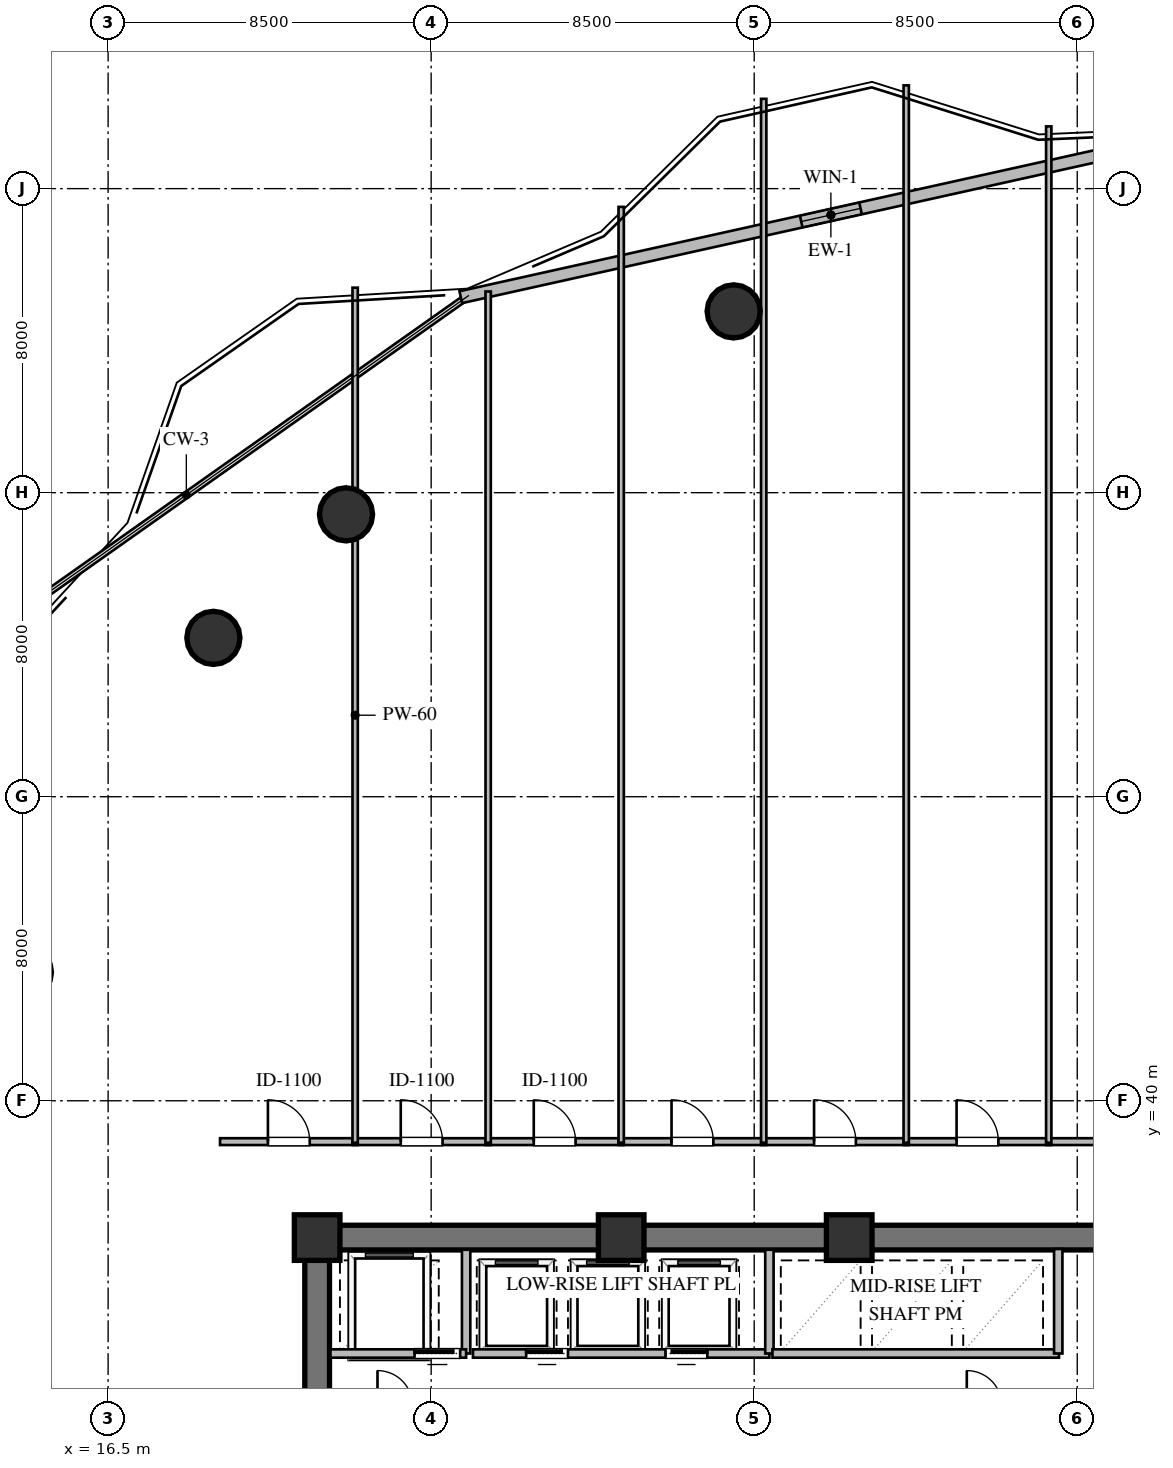
"""IFC4 building model, lengths in metres.
Left out: names, types, materials, properties, quantities, classifications, styles, units other than length and angle.
Written with IfcOpenShell. Run it as: python <this file> out.ifc"""

import sys

from ifc_helpers import new_model, si_unit, direction, frame, frame_2d, origin, origin_2d, place, context, subcontext, project, spatial, rectangle, circle, extrude, element, fill, save


model = new_model("IFC4")
c1 = context("Model", 3, precision=1e-05, world=origin(), true_north=direction((0.0, 1.0)))
c2 = subcontext(c1, "Body", "Model", "MODEL_VIEW")
j1 = project(units=[si_unit("LENGTHUNIT", "METRE"), si_unit("PLANEANGLEUNIT", "RADIAN")], contexts=[c1])
p1 = place(None, origin())
s1 = spatial("IfcSite", under=j1, at=p1, CompositionType="ELEMENT")
p2 = place(p1, origin())
s2 = spatial("IfcBuilding", under=s1, at=p2, CompositionType="ELEMENT")
p3 = place(p2, frame((0.0, 0.0, 63.6)))
s3 = spatial("IfcBuildingStorey", under=s2, at=p3, CompositionType="ELEMENT", Elevation=63.6)
p4 = place(p3, frame((21.675, 36.4, 0.0), z_axis=(0.0, 0.0, 1.0), x_axis=(1.0, 0.0, 0.0)))
e1 = element("IfcWall", 1, at=p4, inside=s3, PredefinedType="SHEAR", context=c2, shape_type="SweptSolid", body=[
    extrude(rectangle(XDim=22.65, YDim=0.65, at=frame_2d((11.325, 0.0))), origin(), (0.0, 0.0, 1.0), 3.36),
])
p5 = place(p3, frame((22.0, 23.925, 0.0), z_axis=(0.0, 0.0, 1.0), x_axis=(0.0, 1.0, 0.0)))
e2 = element("IfcWall", 2, at=p5, inside=s3, PredefinedType="SHEAR", context=c2, shape_type="SweptSolid", body=[
    extrude(rectangle(XDim=12.15, YDim=0.65, at=frame_2d((6.075, 0.0))), origin(), (0.0, 0.0, 1.0), 3.36),
])
for number, where, z_axis, x_axis in (
    (3, (36.0, 36.4, 0.0), (0.0, 0.0, 1.0), (1.0, 0.0, 0.0)),
    (4, (30.0, 36.4, 0.0), (0.0, 0.0, 1.0), (1.0, 0.0, 0.0)),
    (5, (22.0, 36.4, 0.0), (0.0, 0.0, 1.0), (1.0, 0.0, 0.0)),
):
    element("IfcColumn", number, at=place(p3, frame(where, z_axis=z_axis, x_axis=x_axis)), inside=s3, PredefinedType="COLUMN", context=c2, shape_type="SweptSolid", body=[
        extrude(rectangle(XDim=1.2, YDim=1.2, at=origin_2d()), origin(), (0.0, 0.0, 1.0), 3.6),
    ])
for number, where, z_axis, x_axis in (
    (6, (32.96, 60.77, 0.0), (0.0, 0.0, 1.0), (1.0, 0.0, 0.0)),
    (7, (22.76, 55.43, 0.0), (0.0, 0.0, 1.0), (1.0, 0.0, 0.0)),
    (8, (19.27, 52.18, 0.0), (0.0, 0.0, 1.0), (1.0, 0.0, 0.0)),
):
    element("IfcColumn", number, at=place(p3, frame(where, z_axis=z_axis, x_axis=x_axis)), inside=s3, PredefinedType="COLUMN", context=c2, shape_type="SweptSolid", body=[
        extrude(circle(Radius=0.7, at=origin_2d()), origin(), (0.0, 0.0, 1.0), 3.6),
    ])
p6 = place(p3, frame((25.78, 61.144, 0.0), z_axis=(0.0, 0.0, 1.0), x_axis=(0.976206349039, 0.216843639742, 0.0)))
e9 = element("IfcWall", 9, at=p6, inside=s3, PredefinedType="STANDARD", context=c2, shape_type="SweptSolid", body=[
    extrude(rectangle(XDim=19.949, YDim=0.32, at=frame_2d((9.975, 0.0))), origin(), (0.0, 0.0, 1.0), 3.36),
])
p7 = place(p6, frame((9.175, 0.0, 1.05)))
e10 = element("IfcOpeningElement", 10, at=p7, cuts=e9, PredefinedType="OPENING", context=c2, shape_type="SweptSolid", body=[
    extrude(rectangle(XDim=1.6, YDim=1.5, at=frame_2d((0.8, 0.75))), frame((0.0, 0.17, 0.0), z_axis=(0.0, -1.0, 0.0), x_axis=(1.0, 0.0, 0.0)), (0.0, 0.0, 1.0), 0.34),
])
p8 = place(p3, frame((25.92, 33.35, 0.0), z_axis=(0.0, 0.0, 1.0), x_axis=(0.0, 1.0, 0.0)))
e11 = element("IfcWall", 11, at=p8, inside=s3, PredefinedType="SOLIDWALL", context=c2, shape_type="SweptSolid", body=[
    extrude(rectangle(XDim=2.73, YDim=0.22, at=frame_2d((1.365, 0.0))), origin(), (0.0, 0.0, 1.0), 3.36),
])
p9 = place(p3, frame((22.35, 33.35, 0.0), z_axis=(0.0, 0.0, 1.0), x_axis=(1.0, 0.0, 0.0)))
e12 = element("IfcWall", 12, at=p9, inside=s3, PredefinedType="SOLIDWALL", context=c2, shape_type="SweptSolid", body=[
    extrude(rectangle(XDim=3.57, YDim=0.22, at=frame_2d((1.785, 0.0))), origin(), (0.0, 0.0, 1.0), 3.36),
])
p10 = place(p9, frame((2.213, 0.0, 0.0)))
e13 = element("IfcOpeningElement", 13, at=p10, cuts=e12, PredefinedType="OPENING", context=c2, shape_type="SweptSolid", body=[
    extrude(rectangle(XDim=1.2, YDim=2.1, at=frame_2d((0.6, 1.05))), frame((0.0, 0.12, 0.0), z_axis=(0.0, -1.0, 0.0), x_axis=(1.0, 0.0, 0.0)), (0.0, 0.0, 1.0), 0.24),
])
p11 = place(p3, frame((26.1, 33.35, 0.0), z_axis=(0.0, 0.0, 1.0), x_axis=(1.0, 0.0, 0.0)))
e14 = element("IfcWall", 14, at=p11, inside=s3, PredefinedType="SOLIDWALL", context=c2, shape_type="SweptSolid", body=[
    extrude(rectangle(XDim=7.8, YDim=0.22, at=frame_2d((3.9, 0.0))), origin(), (0.0, 0.0, 1.0), 3.36),
])
p12 = place(p11, frame((1.4, 0.0, 0.0)))
e15 = element("IfcOpeningElement", 15, at=p12, cuts=e14, PredefinedType="OPENING", context=c2, shape_type="SweptSolid", body=[
    extrude(rectangle(XDim=1.1, YDim=2.1, at=frame_2d((0.55, 1.05))), frame((0.0, 0.12, 0.0), z_axis=(0.0, -1.0, 0.0), x_axis=(1.0, 0.0, 0.0)), (0.0, 0.0, 1.0), 0.24),
])
p13 = place(p11, frame((5.066, 0.0, 0.0)))
e16 = element("IfcOpeningElement", 16, at=p13, cuts=e14, PredefinedType="OPENING", context=c2, shape_type="SweptSolid", body=[
    extrude(rectangle(XDim=1.1, YDim=2.1, at=frame_2d((0.55, 1.05))), frame((0.0, 0.12, 0.0), z_axis=(0.0, -1.0, 0.0), x_axis=(1.0, 0.0, 0.0)), (0.0, 0.0, 1.0), 0.24),
])
p14 = place(p3, frame((33.9, 33.35, 0.0), z_axis=(0.0, 0.0, 1.0), x_axis=(0.0, 1.0, 0.0)))
e17 = element("IfcWall", 17, at=p14, inside=s3, PredefinedType="SOLIDWALL", context=c2, shape_type="SweptSolid", body=[
    extrude(rectangle(XDim=2.73, YDim=0.22, at=frame_2d((1.365, 0.0))), origin(), (0.0, 0.0, 1.0), 3.36),
])
p15 = place(p3, frame((33.98, 33.35, 0.0), z_axis=(0.0, 0.0, 1.0), x_axis=(1.0, 0.0, 0.0)))
e18 = element("IfcWall", 18, at=p15, inside=s3, PredefinedType="SOLIDWALL", context=c2, shape_type="SweptSolid", body=[
    extrude(rectangle(XDim=7.54, YDim=0.22, at=frame_2d((3.77, 0.0))), origin(), (0.0, 0.0, 1.0), 3.36),
])
p16 = place(p3, frame((41.5, 33.35, 0.0), z_axis=(0.0, 0.0, 1.0), x_axis=(0.0, 1.0, 0.0)))
e19 = element("IfcWall", 19, at=p16, inside=s3, PredefinedType="SOLIDWALL", context=c2, shape_type="SweptSolid", body=[
    extrude(rectangle(XDim=2.75, YDim=0.22, at=frame_2d((1.375, 0.0))), origin(), (0.0, 0.0, 1.0), 3.36),
])
p17 = place(p3, frame((19.445, 38.925, 0.0), z_axis=(0.0, 0.0, 1.0), x_axis=(1.0, 0.0, 0.0)))
e20 = element("IfcWall", 20, at=p17, inside=s3, PredefinedType="PARTITIONING", context=c2, shape_type="SweptSolid", body=[
    extrude(rectangle(XDim=3.62, YDim=0.18, at=frame_2d((1.81, 0.0))), origin(), (0.0, 0.0, 1.0), 3.36),
])
p18 = place(p17, frame((1.26, 0.0, 0.0)))
e21 = element("IfcOpeningElement", 21, at=p18, cuts=e20, PredefinedType="OPENING", context=c2, shape_type="SweptSolid", body=[
    extrude(rectangle(XDim=1.1, YDim=2.1, at=frame_2d((0.55, 1.05))), frame((0.0, 0.1, 0.0), z_axis=(0.0, -1.0, 0.0), x_axis=(1.0, 0.0, 0.0)), (0.0, 0.0, 1.0), 0.2),
])
p19 = place(p3, frame((22.935, 38.925, 0.0), z_axis=(0.0, 0.0, 1.0), x_axis=(1.0, 0.0, 0.0)))
e22 = element("IfcWall", 22, at=p19, inside=s3, PredefinedType="PARTITIONING", context=c2, shape_type="SweptSolid", body=[
    extrude(rectangle(XDim=3.63, YDim=0.18, at=frame_2d((1.815, 0.0))), origin(), (0.0, 0.0, 1.0), 3.36),
])
p20 = place(p19, frame((1.265, 0.0, 0.0)))
e23 = element("IfcOpeningElement", 23, at=p20, cuts=e22, PredefinedType="OPENING", context=c2, shape_type="SweptSolid", body=[
    extrude(rectangle(XDim=1.1, YDim=2.1, at=frame_2d((0.55, 1.05))), frame((0.0, 0.1, 0.0), z_axis=(0.0, -1.0, 0.0), x_axis=(1.0, 0.0, 0.0)), (0.0, 0.0, 1.0), 0.2),
])
p21 = place(p3, frame((26.435, 38.925, 0.0), z_axis=(0.0, 0.0, 1.0), x_axis=(1.0, 0.0, 0.0)))
e24 = element("IfcWall", 24, at=p21, inside=s3, PredefinedType="PARTITIONING", context=c2, shape_type="SweptSolid", body=[
    extrude(rectangle(XDim=3.63, YDim=0.18, at=frame_2d((1.815, 0.0))), origin(), (0.0, 0.0, 1.0), 3.36),
])
p22 = place(p21, frame((1.265, 0.0, 0.0)))
e25 = element("IfcOpeningElement", 25, at=p22, cuts=e24, PredefinedType="OPENING", context=c2, shape_type="SweptSolid", body=[
    extrude(rectangle(XDim=1.1, YDim=2.1, at=frame_2d((0.55, 1.05))), frame((0.0, 0.1, 0.0), z_axis=(0.0, -1.0, 0.0), x_axis=(1.0, 0.0, 0.0)), (0.0, 0.0, 1.0), 0.2),
])
p23 = place(p3, frame((29.935, 38.925, 0.0), z_axis=(0.0, 0.0, 1.0), x_axis=(1.0, 0.0, 0.0)))
e26 = element("IfcWall", 26, at=p23, inside=s3, PredefinedType="PARTITIONING", context=c2, shape_type="SweptSolid", body=[
    extrude(rectangle(XDim=3.88, YDim=0.18, at=frame_2d((1.94, 0.0))), origin(), (0.0, 0.0, 1.0), 3.36),
])
p24 = place(p23, frame((1.39, 0.0, 0.0)))
e27 = element("IfcOpeningElement", 27, at=p24, cuts=e26, PredefinedType="OPENING", context=c2, shape_type="SweptSolid", body=[
    extrude(rectangle(XDim=1.1, YDim=2.1, at=frame_2d((0.55, 1.05))), frame((0.0, 0.1, 0.0), z_axis=(0.0, -1.0, 0.0), x_axis=(1.0, 0.0, 0.0)), (0.0, 0.0, 1.0), 0.2),
])
p25 = place(p3, frame((33.685, 38.925, 0.0), z_axis=(0.0, 0.0, 1.0), x_axis=(1.0, 0.0, 0.0)))
e28 = element("IfcWall", 28, at=p25, inside=s3, PredefinedType="PARTITIONING", context=c2, shape_type="SweptSolid", body=[
    extrude(rectangle(XDim=3.88, YDim=0.18, at=frame_2d((1.94, 0.0))), origin(), (0.0, 0.0, 1.0), 3.36),
])
p26 = place(p25, frame((1.39, 0.0, 0.0)))
e29 = element("IfcOpeningElement", 29, at=p26, cuts=e28, PredefinedType="OPENING", context=c2, shape_type="SweptSolid", body=[
    extrude(rectangle(XDim=1.1, YDim=2.1, at=frame_2d((0.55, 1.05))), frame((0.0, 0.1, 0.0), z_axis=(0.0, -1.0, 0.0), x_axis=(1.0, 0.0, 0.0)), (0.0, 0.0, 1.0), 0.2),
])
p27 = place(p3, frame((37.435, 38.925, 0.0), z_axis=(0.0, 0.0, 1.0), x_axis=(1.0, 0.0, 0.0)))
e30 = element("IfcWall", 30, at=p27, inside=s3, PredefinedType="PARTITIONING", context=c2, shape_type="SweptSolid", body=[
    extrude(rectangle(XDim=3.88, YDim=0.18, at=frame_2d((1.94, 0.0))), origin(), (0.0, 0.0, 1.0), 3.36),
])
p28 = place(p27, frame((1.39, 0.0, 0.0)))
e31 = element("IfcOpeningElement", 31, at=p28, cuts=e30, PredefinedType="OPENING", context=c2, shape_type="SweptSolid", body=[
    extrude(rectangle(XDim=1.1, YDim=2.1, at=frame_2d((0.55, 1.05))), frame((0.0, 0.1, 0.0), z_axis=(0.0, -1.0, 0.0), x_axis=(1.0, 0.0, 0.0)), (0.0, 0.0, 1.0), 0.2),
])
p29 = place(p3, frame((41.185, 38.925, 0.0), z_axis=(0.0, 0.0, 1.0), x_axis=(1.0, 0.0, 0.0)))
e32 = element("IfcWall", 32, at=p29, inside=s3, PredefinedType="PARTITIONING", context=c2, shape_type="SweptSolid", body=[
    extrude(rectangle(XDim=5.37, YDim=0.18, at=frame_2d((2.685, 0.0))), origin(), (0.0, 0.0, 1.0), 3.36),
])
p30 = place(p29, frame((2.135, 0.0, 0.0)))
e33 = element("IfcOpeningElement", 33, at=p30, cuts=e32, PredefinedType="OPENING", context=c2, shape_type="SweptSolid", body=[
    extrude(rectangle(XDim=1.1, YDim=2.1, at=frame_2d((0.55, 1.05))), frame((0.0, 0.1, 0.0), z_axis=(0.0, -1.0, 0.0), x_axis=(1.0, 0.0, 0.0)), (0.0, 0.0, 1.0), 0.2),
])
p31 = place(p3, frame((23.0, 61.394, 0.0), z_axis=(0.0, 0.0, 1.0), x_axis=(0.0, -1.0, 0.0)))
e34 = element("IfcWall", 34, at=p31, inside=s3, PredefinedType="PARTITIONING", context=c2, shape_type="SweptSolid", body=[
    extrude(rectangle(XDim=22.499, YDim=0.14, at=frame_2d((11.25, 0.0))), origin(), (0.0, 0.0, 1.0), 2.806),
])
p32 = place(p3, frame((26.5, 61.294, 0.0), z_axis=(0.0, 0.0, 1.0), x_axis=(0.0, -1.0, 0.0)))
e35 = element("IfcWall", 35, at=p32, inside=s3, PredefinedType="PARTITIONING", context=c2, shape_type="SweptSolid", body=[
    extrude(rectangle(XDim=22.399, YDim=0.14, at=frame_2d((11.199, 0.0))), origin(), (0.0, 0.0, 1.0), 3.36),
])
p33 = place(p3, frame((30.0, 63.52, 0.0), z_axis=(0.0, 0.0, 1.0), x_axis=(0.0, -1.0, 0.0)))
e36 = element("IfcWall", 36, at=p33, inside=s3, PredefinedType="PARTITIONING", context=c2, shape_type="SweptSolid", body=[
    extrude(rectangle(XDim=24.625, YDim=0.14, at=frame_2d((12.312, 0.0))), origin(), (0.0, 0.0, 1.0), 2.806),
])
p34 = place(p3, frame((33.75, 66.362, 0.0), z_axis=(0.0, 0.0, 1.0), x_axis=(0.0, -1.0, 0.0)))
e37 = element("IfcWall", 37, at=p34, inside=s3, PredefinedType="PARTITIONING", context=c2, shape_type="SweptSolid", body=[
    extrude(rectangle(XDim=27.467, YDim=0.14, at=frame_2d((13.733, 0.0))), origin(), (0.0, 0.0, 1.0), 3.36),
])
p35 = place(p3, frame((37.5, 66.717, 0.0), z_axis=(0.0, 0.0, 1.0), x_axis=(0.0, -1.0, 0.0)))
e38 = element("IfcWall", 38, at=p35, inside=s3, PredefinedType="PARTITIONING", context=c2, shape_type="SweptSolid", body=[
    extrude(rectangle(XDim=27.822, YDim=0.14, at=frame_2d((13.911, 0.0))), origin(), (0.0, 0.0, 1.0), 3.36),
])
p36 = place(p3, frame((41.25, 65.638, 0.0), z_axis=(0.0, 0.0, 1.0), x_axis=(0.0, -1.0, 0.0)))
e39 = element("IfcWall", 39, at=p36, inside=s3, PredefinedType="PARTITIONING", context=c2, shape_type="SweptSolid", body=[
    extrude(rectangle(XDim=26.743, YDim=0.14, at=frame_2d((13.372, 0.0))), origin(), (0.0, 0.0, 1.0), 3.36),
])
p37 = place(p7, origin())
e40 = element("IfcWindow", 40, at=p37, inside=s3, PartitioningType="SINGLE_PANEL", PredefinedType="WINDOW", context=c2, shape_type="SweptSolid", body=[
    extrude(rectangle(XDim=1.6, YDim=1.5, at=frame_2d((0.8, 0.75))), frame((0.0, 0.03, 0.0), z_axis=(0.0, -1.0, 0.0), x_axis=(1.0, 0.0, 0.0)), (0.0, 0.0, 1.0), 0.06),
])
fill(e10, e40)
p38 = place(p10, origin())
e41 = element("IfcDoor", 41, at=p38, inside=s3, OperationType="SLIDING_TO_LEFT", PredefinedType="DOOR", context=c2, shape_type="SweptSolid", body=[
    extrude(rectangle(XDim=1.2, YDim=2.1, at=frame_2d((0.6, 1.05))), frame((0.0, 0.025, 0.0), z_axis=(0.0, -1.0, 0.0), x_axis=(1.0, 0.0, 0.0)), (0.0, 0.0, 1.0), 0.05),
])
fill(e13, e41)
p39 = place(p12, origin())
e42 = element("IfcDoor", 42, at=p39, inside=s3, OperationType="SLIDING_TO_LEFT", PredefinedType="DOOR", context=c2, shape_type="SweptSolid", body=[
    extrude(rectangle(XDim=1.1, YDim=2.1, at=frame_2d((0.55, 1.05))), frame((0.0, 0.025, 0.0), z_axis=(0.0, -1.0, 0.0), x_axis=(1.0, 0.0, 0.0)), (0.0, 0.0, 1.0), 0.05),
])
fill(e15, e42)
p40 = place(p13, origin())
e43 = element("IfcDoor", 43, at=p40, inside=s3, OperationType="SLIDING_TO_RIGHT", PredefinedType="DOOR", context=c2, shape_type="SweptSolid", body=[
    extrude(rectangle(XDim=1.1, YDim=2.1, at=frame_2d((0.55, 1.05))), frame((0.0, 0.025, 0.0), z_axis=(0.0, -1.0, 0.0), x_axis=(1.0, 0.0, 0.0)), (0.0, 0.0, 1.0), 0.05),
])
fill(e16, e43)
p41 = place(p18, origin())
e44 = element("IfcDoor", 44, at=p41, inside=s3, OperationType="SINGLE_SWING_LEFT", PredefinedType="DOOR", context=c2, shape_type="SweptSolid", body=[
    extrude(rectangle(XDim=1.1, YDim=2.1, at=frame_2d((0.55, 1.05))), frame((0.0, 0.025, 0.0), z_axis=(0.0, -1.0, 0.0), x_axis=(1.0, 0.0, 0.0)), (0.0, 0.0, 1.0), 0.05),
])
fill(e21, e44)
p42 = place(p20, origin())
e45 = element("IfcDoor", 45, at=p42, inside=s3, OperationType="SINGLE_SWING_LEFT", PredefinedType="DOOR", context=c2, shape_type="SweptSolid", body=[
    extrude(rectangle(XDim=1.1, YDim=2.1, at=frame_2d((0.55, 1.05))), frame((0.0, 0.025, 0.0), z_axis=(0.0, -1.0, 0.0), x_axis=(1.0, 0.0, 0.0)), (0.0, 0.0, 1.0), 0.05),
])
fill(e23, e45)
p43 = place(p22, origin())
e46 = element("IfcDoor", 46, at=p43, inside=s3, OperationType="SINGLE_SWING_LEFT", PredefinedType="DOOR", context=c2, shape_type="SweptSolid", body=[
    extrude(rectangle(XDim=1.1, YDim=2.1, at=frame_2d((0.55, 1.05))), frame((0.0, 0.025, 0.0), z_axis=(0.0, -1.0, 0.0), x_axis=(1.0, 0.0, 0.0)), (0.0, 0.0, 1.0), 0.05),
])
fill(e25, e46)
p44 = place(p24, origin())
e47 = element("IfcDoor", 47, at=p44, inside=s3, OperationType="SINGLE_SWING_LEFT", PredefinedType="DOOR", context=c2, shape_type="SweptSolid", body=[
    extrude(rectangle(XDim=1.1, YDim=2.1, at=frame_2d((0.55, 1.05))), frame((0.0, 0.025, 0.0), z_axis=(0.0, -1.0, 0.0), x_axis=(1.0, 0.0, 0.0)), (0.0, 0.0, 1.0), 0.05),
])
fill(e27, e47)
p45 = place(p26, origin())
e48 = element("IfcDoor", 48, at=p45, inside=s3, OperationType="SINGLE_SWING_LEFT", PredefinedType="DOOR", context=c2, shape_type="SweptSolid", body=[
    extrude(rectangle(XDim=1.1, YDim=2.1, at=frame_2d((0.55, 1.05))), frame((0.0, 0.025, 0.0), z_axis=(0.0, -1.0, 0.0), x_axis=(1.0, 0.0, 0.0)), (0.0, 0.0, 1.0), 0.05),
])
fill(e29, e48)
p46 = place(p28, origin())
e49 = element("IfcDoor", 49, at=p46, inside=s3, OperationType="SINGLE_SWING_LEFT", PredefinedType="DOOR", context=c2, shape_type="SweptSolid", body=[
    extrude(rectangle(XDim=1.1, YDim=2.1, at=frame_2d((0.55, 1.05))), frame((0.0, 0.025, 0.0), z_axis=(0.0, -1.0, 0.0), x_axis=(1.0, 0.0, 0.0)), (0.0, 0.0, 1.0), 0.05),
])
fill(e31, e49)
save(model, sys.argv[1])
